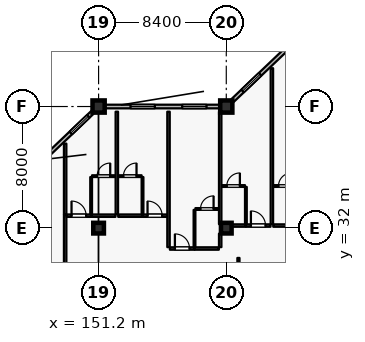
"""IFC4 building model, lengths in metres.
Left out: names, types, materials, properties, quantities, classifications, styles, units other than length and angle.
Written with IfcOpenShell. Run it as: python <this file> out.ifc"""

import sys

from ifc_helpers import new_model, si_unit, direction, frame, frame_2d, origin, origin_2d, place, context, subcontext, project, spatial, rectangle, extrude, element, fill, save


model = new_model("IFC4")
c1 = context("Model", 3, precision=1e-05, world=origin(), true_north=direction((0.0, 1.0)))
c2 = subcontext(c1, "Body", "Model", "MODEL_VIEW")
j1 = project(units=[si_unit("LENGTHUNIT", "METRE"), si_unit("PLANEANGLEUNIT", "RADIAN")], contexts=[c1])
p1 = place(None, origin())
s1 = spatial("IfcSite", under=j1, at=p1, CompositionType="ELEMENT")
p2 = place(p1, origin())
s2 = spatial("IfcBuilding", under=s1, at=p2, CompositionType="ELEMENT")
p3 = place(p2, frame((0.0, 0.0, 21.0)))
s3 = spatial("IfcBuildingStorey", under=s2, at=p3, CompositionType="ELEMENT", Elevation=21.0)
for number, where, z_axis, x_axis in (
    (1, (151.2, 40.0, 0.0), (0.0, 0.0, 1.0), (1.0, 0.0, 0.0)),
    (2, (159.6, 40.0, 0.0), (0.0, 0.0, 1.0), (1.0, 0.0, 0.0)),
):
    element("IfcColumn", number, at=place(p3, frame(where, z_axis=z_axis, x_axis=x_axis)), inside=s3, PredefinedType="COLUMN", context=c2, shape_type="SweptSolid", body=[
        extrude(rectangle(XDim=0.8, YDim=0.8, at=origin_2d()), origin(), (0.0, 0.0, 1.0), 4.2),
    ])
for number, where, z_axis, x_axis in (
    (3, (151.2, 32.0, 0.0), (0.0, 0.0, 1.0), (1.0, 0.0, 0.0)),
    (4, (159.6, 32.0, 0.0), (0.0, 0.0, 1.0), (1.0, 0.0, 0.0)),
):
    element("IfcColumn", number, at=place(p3, frame(where, z_axis=z_axis, x_axis=x_axis)), inside=s3, PredefinedType="COLUMN", context=c2, shape_type="SweptSolid", body=[
        extrude(rectangle(XDim=0.7, YDim=0.7, at=origin_2d()), origin(), (0.0, 0.0, 1.0), 4.2),
    ])
p4 = place(p3, frame((143.2, 32.381, 0.0), z_axis=(0.0, 0.0, 1.0), x_axis=(0.724156739794, 0.689635422677, 0.0)))
e5 = element("IfcWall", 5, at=p4, inside=s3, PredefinedType="SOLIDWALL", context=c2, shape_type="SweptSolid", body=[
    extrude(rectangle(XDim=10.495, YDim=0.24, at=frame_2d((5.248, 0.0))), origin(), (0.0, 0.0, 1.0), 3.53),
])
p5 = place(p4, frame((0.788, 0.0, 0.8)))
e6 = element("IfcOpeningElement", 6, at=p5, cuts=e5, PredefinedType="OPENING", context=c2, shape_type="SweptSolid", body=[
    extrude(rectangle(XDim=1.6, YDim=1.6, at=frame_2d((0.8, 0.8))), frame((0.0, 0.13, 0.0), z_axis=(0.0, -1.0, 0.0), x_axis=(1.0, 0.0, 0.0)), (0.0, 0.0, 1.0), 0.26),
])
p6 = place(p4, frame((4.862, 0.0, 0.8)))
e7 = element("IfcOpeningElement", 7, at=p6, cuts=e5, PredefinedType="OPENING", context=c2, shape_type="SweptSolid", body=[
    extrude(rectangle(XDim=1.6, YDim=1.6, at=frame_2d((0.8, 0.8))), frame((0.0, 0.13, 0.0), z_axis=(0.0, -1.0, 0.0), x_axis=(1.0, 0.0, 0.0)), (0.0, 0.0, 1.0), 0.26),
])
p7 = place(p4, frame((8.521, 0.0, 0.8)))
e8 = element("IfcOpeningElement", 8, at=p7, cuts=e5, PredefinedType="OPENING", context=c2, shape_type="SweptSolid", body=[
    extrude(rectangle(XDim=1.6, YDim=1.6, at=frame_2d((0.8, 0.8))), frame((0.0, 0.13, 0.0), z_axis=(0.0, -1.0, 0.0), x_axis=(1.0, 0.0, 0.0)), (0.0, 0.0, 1.0), 0.26),
])
p8 = place(p3, frame((151.6, 40.0, 0.0), z_axis=(0.0, 0.0, 1.0), x_axis=(1.0, 0.0, 0.0)))
e9 = element("IfcWall", 9, at=p8, inside=s3, PredefinedType="SOLIDWALL", context=c2, shape_type="SweptSolid", body=[
    extrude(rectangle(XDim=7.6, YDim=0.24, at=frame_2d((3.8, 0.0))), origin(), (0.0, 0.0, 1.0), 3.53),
])
p9 = place(p8, frame((1.7, 0.0, 0.8)))
e10 = element("IfcOpeningElement", 10, at=p9, cuts=e9, PredefinedType="OPENING", context=c2, shape_type="SweptSolid", body=[
    extrude(rectangle(XDim=1.6, YDim=1.6, at=frame_2d((0.8, 0.8))), frame((0.0, 0.13, 0.0), z_axis=(0.0, -1.0, 0.0), x_axis=(1.0, 0.0, 0.0)), (0.0, 0.0, 1.0), 0.26),
])
p10 = place(p8, frame((5.1, 0.0, 0.8)))
e11 = element("IfcOpeningElement", 11, at=p10, cuts=e9, PredefinedType="OPENING", context=c2, shape_type="SweptSolid", body=[
    extrude(rectangle(XDim=1.6, YDim=1.6, at=frame_2d((0.8, 0.8))), frame((0.0, 0.13, 0.0), z_axis=(0.0, -1.0, 0.0), x_axis=(1.0, 0.0, 0.0)), (0.0, 0.0, 1.0), 0.26),
])
p11 = place(p3, frame((160.0, 40.381, 0.0), z_axis=(0.0, 0.0, 1.0), x_axis=(0.724156739794, 0.689635422677, 0.0)))
e12 = element("IfcWall", 12, at=p11, inside=s3, PredefinedType="SOLIDWALL", context=c2, shape_type="SweptSolid", body=[
    extrude(rectangle(XDim=10.495, YDim=0.24, at=frame_2d((5.248, 0.0))), origin(), (0.0, 0.0, 1.0), 3.53),
])
p12 = place(p11, frame((0.926, 0.0, 0.8)))
e13 = element("IfcOpeningElement", 13, at=p12, cuts=e12, PredefinedType="OPENING", context=c2, shape_type="SweptSolid", body=[
    extrude(rectangle(XDim=1.6, YDim=1.6, at=frame_2d((0.8, 0.8))), frame((0.0, 0.13, 0.0), z_axis=(0.0, -1.0, 0.0), x_axis=(1.0, 0.0, 0.0)), (0.0, 0.0, 1.0), 0.26),
])
p13 = place(p11, frame((5.138, 0.0, 0.8)))
e14 = element("IfcOpeningElement", 14, at=p13, cuts=e12, PredefinedType="OPENING", context=c2, shape_type="SweptSolid", body=[
    extrude(rectangle(XDim=1.6, YDim=1.6, at=frame_2d((0.8, 0.8))), frame((0.0, 0.13, 0.0), z_axis=(0.0, -1.0, 0.0), x_axis=(1.0, 0.0, 0.0)), (0.0, 0.0, 1.0), 0.26),
])
p14 = place(p11, frame((8.659, 0.0, 0.8)))
e15 = element("IfcOpeningElement", 15, at=p14, cuts=e12, PredefinedType="OPENING", context=c2, shape_type="SweptSolid", body=[
    extrude(rectangle(XDim=1.6, YDim=1.6, at=frame_2d((0.8, 0.8))), frame((0.0, 0.13, 0.0), z_axis=(0.0, -1.0, 0.0), x_axis=(1.0, 0.0, 0.0)), (0.0, 0.0, 1.0), 0.26),
])
p15 = place(p3, frame((149.0, 28.46, 0.0), z_axis=(0.0, 0.0, 1.0), x_axis=(0.0, 1.0, 0.0)))
e16 = element("IfcWall", 16, at=p15, inside=s3, PredefinedType="PARTITIONING", context=c2, shape_type="SweptSolid", body=[
    extrude(rectangle(XDim=4.44, YDim=0.16, at=frame_2d((2.22, 0.0))), origin(), (0.0, 0.0, 1.0), 3.965),
])
p16 = place(p3, frame((149.09, 32.82, 0.0), z_axis=(0.0, 0.0, 1.0), x_axis=(1.0, 0.0, 0.0)))
e17 = element("IfcWall", 17, at=p16, inside=s3, PredefinedType="PARTITIONING", context=c2, shape_type="SweptSolid", body=[
    extrude(rectangle(XDim=1.62, YDim=0.16, at=frame_2d((0.81, 0.0))), origin(), (0.0, 0.0, 1.0), 3.965),
])
p17 = place(p16, frame((0.33, 0.0, 0.0)))
e18 = element("IfcOpeningElement", 18, at=p17, cuts=e17, PredefinedType="OPENING", context=c2, shape_type="SweptSolid", body=[
    extrude(rectangle(XDim=0.96, YDim=2.2, at=frame_2d((0.48, 1.1))), frame((0.0, 0.09, 0.0), z_axis=(0.0, -1.0, 0.0), x_axis=(1.0, 0.0, 0.0)), (0.0, 0.0, 1.0), 0.18),
])
p18 = place(p3, frame((150.72, 32.82, 0.0), z_axis=(0.0, 0.0, 1.0), x_axis=(1.0, 0.0, 0.0)))
e19 = element("IfcWall", 19, at=p18, inside=s3, PredefinedType="PARTITIONING", context=c2, shape_type="SweptSolid", body=[
    extrude(rectangle(XDim=1.59, YDim=0.16, at=frame_2d((0.795, 0.0))), origin(), (0.0, 0.0, 1.0), 3.965),
])
p19 = place(p3, frame((150.71, 32.91, 0.0), z_axis=(0.0, 0.0, 1.0), x_axis=(0.0, 1.0, 0.0)))
e20 = element("IfcWall", 20, at=p19, inside=s3, PredefinedType="PARTITIONING", context=c2, shape_type="SweptSolid", body=[
    extrude(rectangle(XDim=2.45, YDim=0.115, at=frame_2d((1.225, 0.0))), origin(), (0.0, 0.0, 1.0), 3.965),
])
p20 = place(p3, frame((150.77, 35.42, 0.0), z_axis=(0.0, 0.0, 1.0), x_axis=(1.0, 0.0, 0.0)))
e21 = element("IfcWall", 21, at=p20, inside=s3, PredefinedType="PARTITIONING", context=c2, shape_type="SweptSolid", body=[
    extrude(rectangle(XDim=1.53, YDim=0.115, at=frame_2d((0.765, 0.0))), origin(), (0.0, 0.0, 1.0), 3.965),
])
p21 = place(p20, frame((0.335, 0.0, 0.0)))
e22 = element("IfcOpeningElement", 22, at=p21, cuts=e21, PredefinedType="OPENING", context=c2, shape_type="SweptSolid", body=[
    extrude(rectangle(XDim=0.86, YDim=2.12, at=frame_2d((0.43, 1.06))), frame((0.0, 0.067, 0.0), z_axis=(0.0, -1.0, 0.0), x_axis=(1.0, 0.0, 0.0)), (0.0, 0.0, 1.0), 0.135),
])
p22 = place(p3, frame((149.0, 32.91, 0.0), z_axis=(0.0, 0.0, 1.0), x_axis=(0.0, 1.0, 0.0)))
e23 = element("IfcWall", 23, at=p22, inside=s3, PredefinedType="PARTITIONING", context=c2, shape_type="SweptSolid", body=[
    extrude(rectangle(XDim=4.65, YDim=0.16, at=frame_2d((2.325, 0.0))), origin(), (0.0, 0.0, 1.0), 3.965),
])
p23 = place(p3, frame((152.49, 32.82, 0.0), z_axis=(0.0, 0.0, 1.0), x_axis=(1.0, 0.0, 0.0)))
e24 = element("IfcWall", 24, at=p23, inside=s3, PredefinedType="PARTITIONING", context=c2, shape_type="SweptSolid", body=[
    extrude(rectangle(XDim=1.59, YDim=0.16, at=frame_2d((0.795, 0.0))), origin(), (0.0, 0.0, 1.0), 3.965),
])
p24 = place(p3, frame((154.09, 32.82, 0.0), z_axis=(0.0, 0.0, 1.0), x_axis=(1.0, 0.0, 0.0)))
e25 = element("IfcWall", 25, at=p24, inside=s3, PredefinedType="PARTITIONING", context=c2, shape_type="SweptSolid", body=[
    extrude(rectangle(XDim=1.62, YDim=0.16, at=frame_2d((0.81, 0.0))), origin(), (0.0, 0.0, 1.0), 3.965),
])
p25 = place(p24, frame((0.33, 0.0, 0.0)))
e26 = element("IfcOpeningElement", 26, at=p25, cuts=e25, PredefinedType="OPENING", context=c2, shape_type="SweptSolid", body=[
    extrude(rectangle(XDim=0.96, YDim=2.2, at=frame_2d((0.48, 1.1))), frame((0.0, 0.09, 0.0), z_axis=(0.0, -1.0, 0.0), x_axis=(1.0, 0.0, 0.0)), (0.0, 0.0, 1.0), 0.18),
])
p26 = place(p3, frame((154.09, 32.91, 0.0), z_axis=(0.0, 0.0, 1.0), x_axis=(0.0, 1.0, 0.0)))
e27 = element("IfcWall", 27, at=p26, inside=s3, PredefinedType="PARTITIONING", context=c2, shape_type="SweptSolid", body=[
    extrude(rectangle(XDim=2.45, YDim=0.115, at=frame_2d((1.225, 0.0))), origin(), (0.0, 0.0, 1.0), 3.965),
])
p27 = place(p3, frame((152.5, 35.42, 0.0), z_axis=(0.0, 0.0, 1.0), x_axis=(1.0, 0.0, 0.0)))
e28 = element("IfcWall", 28, at=p27, inside=s3, PredefinedType="PARTITIONING", context=c2, shape_type="SweptSolid", body=[
    extrude(rectangle(XDim=1.53, YDim=0.115, at=frame_2d((0.765, 0.0))), origin(), (0.0, 0.0, 1.0), 3.965),
])
p28 = place(p27, frame((0.335, 0.0, 0.0)))
e29 = element("IfcOpeningElement", 29, at=p28, cuts=e28, PredefinedType="OPENING", context=c2, shape_type="SweptSolid", body=[
    extrude(rectangle(XDim=0.86, YDim=2.12, at=frame_2d((0.43, 1.06))), frame((0.0, 0.067, 0.0), z_axis=(0.0, -1.0, 0.0), x_axis=(1.0, 0.0, 0.0)), (0.0, 0.0, 1.0), 0.135),
])
p29 = place(p3, frame((152.4, 32.91, 0.0), z_axis=(0.0, 0.0, 1.0), x_axis=(0.0, 1.0, 0.0)))
e30 = element("IfcWall", 30, at=p29, inside=s3, PredefinedType="PARTITIONING", context=c2, shape_type="SweptSolid", body=[
    extrude(rectangle(XDim=6.75, YDim=0.16, at=frame_2d((3.375, 0.0))), origin(), (0.0, 0.0, 1.0), 3.965),
])
p30 = place(p3, frame((155.89, 30.66, 0.0), z_axis=(0.0, 0.0, 1.0), x_axis=(1.0, 0.0, 0.0)))
e31 = element("IfcWall", 31, at=p30, inside=s3, PredefinedType="PARTITIONING", context=c2, shape_type="SweptSolid", body=[
    extrude(rectangle(XDim=1.62, YDim=0.16, at=frame_2d((0.81, 0.0))), origin(), (0.0, 0.0, 1.0), 3.965),
])
p31 = place(p30, frame((0.33, 0.0, 0.0)))
e32 = element("IfcOpeningElement", 32, at=p31, cuts=e31, PredefinedType="OPENING", context=c2, shape_type="SweptSolid", body=[
    extrude(rectangle(XDim=0.96, YDim=2.2, at=frame_2d((0.48, 1.1))), frame((0.0, 0.09, 0.0), z_axis=(0.0, -1.0, 0.0), x_axis=(1.0, 0.0, 0.0)), (0.0, 0.0, 1.0), 0.18),
])
p32 = place(p3, frame((157.52, 30.66, 0.0), z_axis=(0.0, 0.0, 1.0), x_axis=(1.0, 0.0, 0.0)))
e33 = element("IfcWall", 33, at=p32, inside=s3, PredefinedType="PARTITIONING", context=c2, shape_type="SweptSolid", body=[
    extrude(rectangle(XDim=1.59, YDim=0.16, at=frame_2d((0.795, 0.0))), origin(), (0.0, 0.0, 1.0), 3.965),
])
p33 = place(p3, frame((157.51, 30.75, 0.0), z_axis=(0.0, 0.0, 1.0), x_axis=(0.0, 1.0, 0.0)))
e34 = element("IfcWall", 34, at=p33, inside=s3, PredefinedType="PARTITIONING", context=c2, shape_type="SweptSolid", body=[
    extrude(rectangle(XDim=2.45, YDim=0.115, at=frame_2d((1.225, 0.0))), origin(), (0.0, 0.0, 1.0), 3.965),
])
p34 = place(p3, frame((157.57, 33.26, 0.0), z_axis=(0.0, 0.0, 1.0), x_axis=(1.0, 0.0, 0.0)))
e35 = element("IfcWall", 35, at=p34, inside=s3, PredefinedType="PARTITIONING", context=c2, shape_type="SweptSolid", body=[
    extrude(rectangle(XDim=1.53, YDim=0.115, at=frame_2d((0.765, 0.0))), origin(), (0.0, 0.0, 1.0), 3.965),
])
p35 = place(p34, frame((0.335, 0.0, 0.0)))
e36 = element("IfcOpeningElement", 36, at=p35, cuts=e35, PredefinedType="OPENING", context=c2, shape_type="SweptSolid", body=[
    extrude(rectangle(XDim=0.86, YDim=2.12, at=frame_2d((0.43, 1.06))), frame((0.0, 0.067, 0.0), z_axis=(0.0, -1.0, 0.0), x_axis=(1.0, 0.0, 0.0)), (0.0, 0.0, 1.0), 0.135),
])
p36 = place(p3, frame((155.8, 30.75, 0.0), z_axis=(0.0, 0.0, 1.0), x_axis=(0.0, 1.0, 0.0)))
e37 = element("IfcWall", 37, at=p36, inside=s3, PredefinedType="PARTITIONING", context=c2, shape_type="SweptSolid", body=[
    extrude(rectangle(XDim=8.91, YDim=0.16, at=frame_2d((4.455, 0.0))), origin(), (0.0, 0.0, 1.0), 3.965),
])
p37 = place(p3, frame((159.2, 30.75, 0.0), z_axis=(0.0, 0.0, 1.0), x_axis=(0.0, 1.0, 0.0)))
e38 = element("IfcWall", 38, at=p37, inside=s3, PredefinedType="PARTITIONING", context=c2, shape_type="SweptSolid", body=[
    extrude(rectangle(XDim=0.89, YDim=0.16, at=frame_2d((0.445, 0.0))), origin(), (0.0, 0.0, 1.0), 3.965),
])
p38 = place(p3, frame((159.29, 32.17, 0.0), z_axis=(0.0, 0.0, 1.0), x_axis=(1.0, 0.0, 0.0)))
e39 = element("IfcWall", 39, at=p38, inside=s3, PredefinedType="PARTITIONING", context=c2, shape_type="SweptSolid", body=[
    extrude(rectangle(XDim=1.59, YDim=0.16, at=frame_2d((0.795, 0.0))), origin(), (0.0, 0.0, 1.0), 3.965),
])
p39 = place(p3, frame((160.89, 32.17, 0.0), z_axis=(0.0, 0.0, 1.0), x_axis=(1.0, 0.0, 0.0)))
e40 = element("IfcWall", 40, at=p39, inside=s3, PredefinedType="PARTITIONING", context=c2, shape_type="SweptSolid", body=[
    extrude(rectangle(XDim=1.62, YDim=0.16, at=frame_2d((0.81, 0.0))), origin(), (0.0, 0.0, 1.0), 3.965),
])
p40 = place(p39, frame((0.33, 0.0, 0.0)))
e41 = element("IfcOpeningElement", 41, at=p40, cuts=e40, PredefinedType="OPENING", context=c2, shape_type="SweptSolid", body=[
    extrude(rectangle(XDim=0.96, YDim=2.2, at=frame_2d((0.48, 1.1))), frame((0.0, 0.09, 0.0), z_axis=(0.0, -1.0, 0.0), x_axis=(1.0, 0.0, 0.0)), (0.0, 0.0, 1.0), 0.18),
])
p41 = place(p3, frame((160.89, 32.26, 0.0), z_axis=(0.0, 0.0, 1.0), x_axis=(0.0, 1.0, 0.0)))
e42 = element("IfcWall", 42, at=p41, inside=s3, PredefinedType="PARTITIONING", context=c2, shape_type="SweptSolid", body=[
    extrude(rectangle(XDim=2.45, YDim=0.115, at=frame_2d((1.225, 0.0))), origin(), (0.0, 0.0, 1.0), 3.965),
])
p42 = place(p3, frame((159.3, 34.77, 0.0), z_axis=(0.0, 0.0, 1.0), x_axis=(1.0, 0.0, 0.0)))
e43 = element("IfcWall", 43, at=p42, inside=s3, PredefinedType="PARTITIONING", context=c2, shape_type="SweptSolid", body=[
    extrude(rectangle(XDim=1.53, YDim=0.115, at=frame_2d((0.765, 0.0))), origin(), (0.0, 0.0, 1.0), 3.965),
])
p43 = place(p42, frame((0.335, 0.0, 0.0)))
e44 = element("IfcOpeningElement", 44, at=p43, cuts=e43, PredefinedType="OPENING", context=c2, shape_type="SweptSolid", body=[
    extrude(rectangle(XDim=0.86, YDim=2.12, at=frame_2d((0.43, 1.06))), frame((0.0, 0.067, 0.0), z_axis=(0.0, -1.0, 0.0), x_axis=(1.0, 0.0, 0.0)), (0.0, 0.0, 1.0), 0.135),
])
p44 = place(p3, frame((159.2, 32.26, 0.0), z_axis=(0.0, 0.0, 1.0), x_axis=(0.0, 1.0, 0.0)))
e45 = element("IfcWall", 45, at=p44, inside=s3, PredefinedType="PARTITIONING", context=c2, shape_type="SweptSolid", body=[
    extrude(rectangle(XDim=7.4, YDim=0.16, at=frame_2d((3.7, 0.0))), origin(), (0.0, 0.0, 1.0), 3.965),
])
p45 = place(p3, frame((162.69, 32.17, 0.0), z_axis=(0.0, 0.0, 1.0), x_axis=(1.0, 0.0, 0.0)))
e46 = element("IfcWall", 46, at=p45, inside=s3, PredefinedType="PARTITIONING", context=c2, shape_type="SweptSolid", body=[
    extrude(rectangle(XDim=1.59, YDim=0.16, at=frame_2d((0.795, 0.0))), origin(), (0.0, 0.0, 1.0), 3.965),
])
p46 = place(p3, frame((162.7, 34.77, 0.0), z_axis=(0.0, 0.0, 1.0), x_axis=(1.0, 0.0, 0.0)))
e47 = element("IfcWall", 47, at=p46, inside=s3, PredefinedType="PARTITIONING", context=c2, shape_type="SweptSolid", body=[
    extrude(rectangle(XDim=1.53, YDim=0.115, at=frame_2d((0.765, 0.0))), origin(), (0.0, 0.0, 1.0), 3.965),
])
p47 = place(p46, frame((0.335, 0.0, 0.0)))
e48 = element("IfcOpeningElement", 48, at=p47, cuts=e47, PredefinedType="OPENING", context=c2, shape_type="SweptSolid", body=[
    extrude(rectangle(XDim=0.86, YDim=2.12, at=frame_2d((0.43, 1.06))), frame((0.0, 0.067, 0.0), z_axis=(0.0, -1.0, 0.0), x_axis=(1.0, 0.0, 0.0)), (0.0, 0.0, 1.0), 0.135),
])
p48 = place(p3, frame((162.6, 32.26, 0.0), z_axis=(0.0, 0.0, 1.0), x_axis=(0.0, 1.0, 0.0)))
e49 = element("IfcWall", 49, at=p48, inside=s3, PredefinedType="PARTITIONING", context=c2, shape_type="SweptSolid", body=[
    extrude(rectangle(XDim=10.26, YDim=0.16, at=frame_2d((5.13, 0.0))), origin(), (0.0, 0.0, 1.0), 3.965),
])
p49 = place(p3, frame((160.4, 24.96, 0.0), z_axis=(0.0, 0.0, 1.0), x_axis=(0.0, 1.0, 0.0)))
e50 = element("IfcWall", 50, at=p49, inside=s3, PredefinedType="PARTITIONING", context=c2, shape_type="SweptSolid", body=[
    extrude(rectangle(XDim=5.08, YDim=0.14, at=frame_2d((2.54, 0.0))), origin(), (0.0, 0.0, 1.0), 3.965),
])
p50 = place(p49, frame((1.59, 0.0, 0.0)))
e51 = element("IfcOpeningElement", 51, at=p50, cuts=e50, PredefinedType="OPENING", context=c2, shape_type="SweptSolid", body=[
    extrude(rectangle(XDim=1.9, YDim=2.4, at=frame_2d((0.95, 1.2))), frame((0.0, 0.08, 0.0), z_axis=(0.0, -1.0, 0.0), x_axis=(1.0, 0.0, 0.0)), (0.0, 0.0, 1.0), 0.16),
])
p51 = place(p7, origin())
e52 = element("IfcWindow", 52, at=p51, inside=s3, PartitioningType="SINGLE_PANEL", PredefinedType="WINDOW", context=c2, shape_type="SweptSolid", body=[
    extrude(rectangle(XDim=1.6, YDim=1.6, at=frame_2d((0.8, 0.8))), frame((0.0, 0.03, 0.0), z_axis=(0.0, -1.0, 0.0), x_axis=(1.0, 0.0, 0.0)), (0.0, 0.0, 1.0), 0.06),
])
fill(e8, e52)
p52 = place(p9, origin())
e53 = element("IfcWindow", 53, at=p52, inside=s3, PartitioningType="SINGLE_PANEL", PredefinedType="WINDOW", context=c2, shape_type="SweptSolid", body=[
    extrude(rectangle(XDim=1.6, YDim=1.6, at=frame_2d((0.8, 0.8))), frame((0.0, 0.03, 0.0), z_axis=(0.0, -1.0, 0.0), x_axis=(1.0, 0.0, 0.0)), (0.0, 0.0, 1.0), 0.06),
])
fill(e10, e53)
p53 = place(p10, origin())
e54 = element("IfcWindow", 54, at=p53, inside=s3, PartitioningType="SINGLE_PANEL", PredefinedType="WINDOW", context=c2, shape_type="SweptSolid", body=[
    extrude(rectangle(XDim=1.6, YDim=1.6, at=frame_2d((0.8, 0.8))), frame((0.0, 0.03, 0.0), z_axis=(0.0, -1.0, 0.0), x_axis=(1.0, 0.0, 0.0)), (0.0, 0.0, 1.0), 0.06),
])
fill(e11, e54)
p54 = place(p12, origin())
e55 = element("IfcWindow", 55, at=p54, inside=s3, PartitioningType="SINGLE_PANEL", PredefinedType="WINDOW", context=c2, shape_type="SweptSolid", body=[
    extrude(rectangle(XDim=1.6, YDim=1.6, at=frame_2d((0.8, 0.8))), frame((0.0, 0.03, 0.0), z_axis=(0.0, -1.0, 0.0), x_axis=(1.0, 0.0, 0.0)), (0.0, 0.0, 1.0), 0.06),
])
fill(e13, e55)
p55 = place(p17, origin())
e56 = element("IfcDoor", 56, at=p55, inside=s3, OperationType="SINGLE_SWING_LEFT", PredefinedType="DOOR", context=c2, shape_type="SweptSolid", body=[
    extrude(rectangle(XDim=0.96, YDim=2.2, at=frame_2d((0.48, 1.1))), frame((0.0, 0.025, 0.0), z_axis=(0.0, -1.0, 0.0), x_axis=(1.0, 0.0, 0.0)), (0.0, 0.0, 1.0), 0.05),
])
fill(e18, e56)
p56 = place(p21, origin())
e57 = element("IfcDoor", 57, at=p56, inside=s3, OperationType="SINGLE_SWING_RIGHT", PredefinedType="DOOR", context=c2, shape_type="SweptSolid", body=[
    extrude(rectangle(XDim=0.86, YDim=2.12, at=frame_2d((0.43, 1.06))), frame((0.0, 0.025, 0.0), z_axis=(0.0, -1.0, 0.0), x_axis=(1.0, 0.0, 0.0)), (0.0, 0.0, 1.0), 0.05),
])
fill(e22, e57)
p57 = place(p25, origin())
e58 = element("IfcDoor", 58, at=p57, inside=s3, OperationType="SINGLE_SWING_LEFT", PredefinedType="DOOR", context=c2, shape_type="SweptSolid", body=[
    extrude(rectangle(XDim=0.96, YDim=2.2, at=frame_2d((0.48, 1.1))), frame((0.0, 0.025, 0.0), z_axis=(0.0, -1.0, 0.0), x_axis=(1.0, 0.0, 0.0)), (0.0, 0.0, 1.0), 0.05),
])
fill(e26, e58)
p58 = place(p28, origin())
e59 = element("IfcDoor", 59, at=p58, inside=s3, OperationType="SINGLE_SWING_RIGHT", PredefinedType="DOOR", context=c2, shape_type="SweptSolid", body=[
    extrude(rectangle(XDim=0.86, YDim=2.12, at=frame_2d((0.43, 1.06))), frame((0.0, 0.025, 0.0), z_axis=(0.0, -1.0, 0.0), x_axis=(1.0, 0.0, 0.0)), (0.0, 0.0, 1.0), 0.05),
])
fill(e29, e59)
p59 = place(p31, origin())
e60 = element("IfcDoor", 60, at=p59, inside=s3, OperationType="SINGLE_SWING_LEFT", PredefinedType="DOOR", context=c2, shape_type="SweptSolid", body=[
    extrude(rectangle(XDim=0.96, YDim=2.2, at=frame_2d((0.48, 1.1))), frame((0.0, 0.025, 0.0), z_axis=(0.0, -1.0, 0.0), x_axis=(1.0, 0.0, 0.0)), (0.0, 0.0, 1.0), 0.05),
])
fill(e32, e60)
p60 = place(p35, origin())
e61 = element("IfcDoor", 61, at=p60, inside=s3, OperationType="SINGLE_SWING_RIGHT", PredefinedType="DOOR", context=c2, shape_type="SweptSolid", body=[
    extrude(rectangle(XDim=0.86, YDim=2.12, at=frame_2d((0.43, 1.06))), frame((0.0, 0.025, 0.0), z_axis=(0.0, -1.0, 0.0), x_axis=(1.0, 0.0, 0.0)), (0.0, 0.0, 1.0), 0.05),
])
fill(e36, e61)
p61 = place(p40, origin())
e62 = element("IfcDoor", 62, at=p61, inside=s3, OperationType="SINGLE_SWING_LEFT", PredefinedType="DOOR", context=c2, shape_type="SweptSolid", body=[
    extrude(rectangle(XDim=0.96, YDim=2.2, at=frame_2d((0.48, 1.1))), frame((0.0, 0.025, 0.0), z_axis=(0.0, -1.0, 0.0), x_axis=(1.0, 0.0, 0.0)), (0.0, 0.0, 1.0), 0.05),
])
fill(e41, e62)
p62 = place(p43, origin())
e63 = element("IfcDoor", 63, at=p62, inside=s3, OperationType="SINGLE_SWING_RIGHT", PredefinedType="DOOR", context=c2, shape_type="SweptSolid", body=[
    extrude(rectangle(XDim=0.86, YDim=2.12, at=frame_2d((0.43, 1.06))), frame((0.0, 0.025, 0.0), z_axis=(0.0, -1.0, 0.0), x_axis=(1.0, 0.0, 0.0)), (0.0, 0.0, 1.0), 0.05),
])
fill(e44, e63)
p63 = place(p47, origin())
e64 = element("IfcDoor", 64, at=p63, inside=s3, OperationType="SINGLE_SWING_RIGHT", PredefinedType="DOOR", context=c2, shape_type="SweptSolid", body=[
    extrude(rectangle(XDim=0.86, YDim=2.12, at=frame_2d((0.43, 1.06))), frame((0.0, 0.025, 0.0), z_axis=(0.0, -1.0, 0.0), x_axis=(1.0, 0.0, 0.0)), (0.0, 0.0, 1.0), 0.05),
])
fill(e48, e64)
save(model, sys.argv[1])
